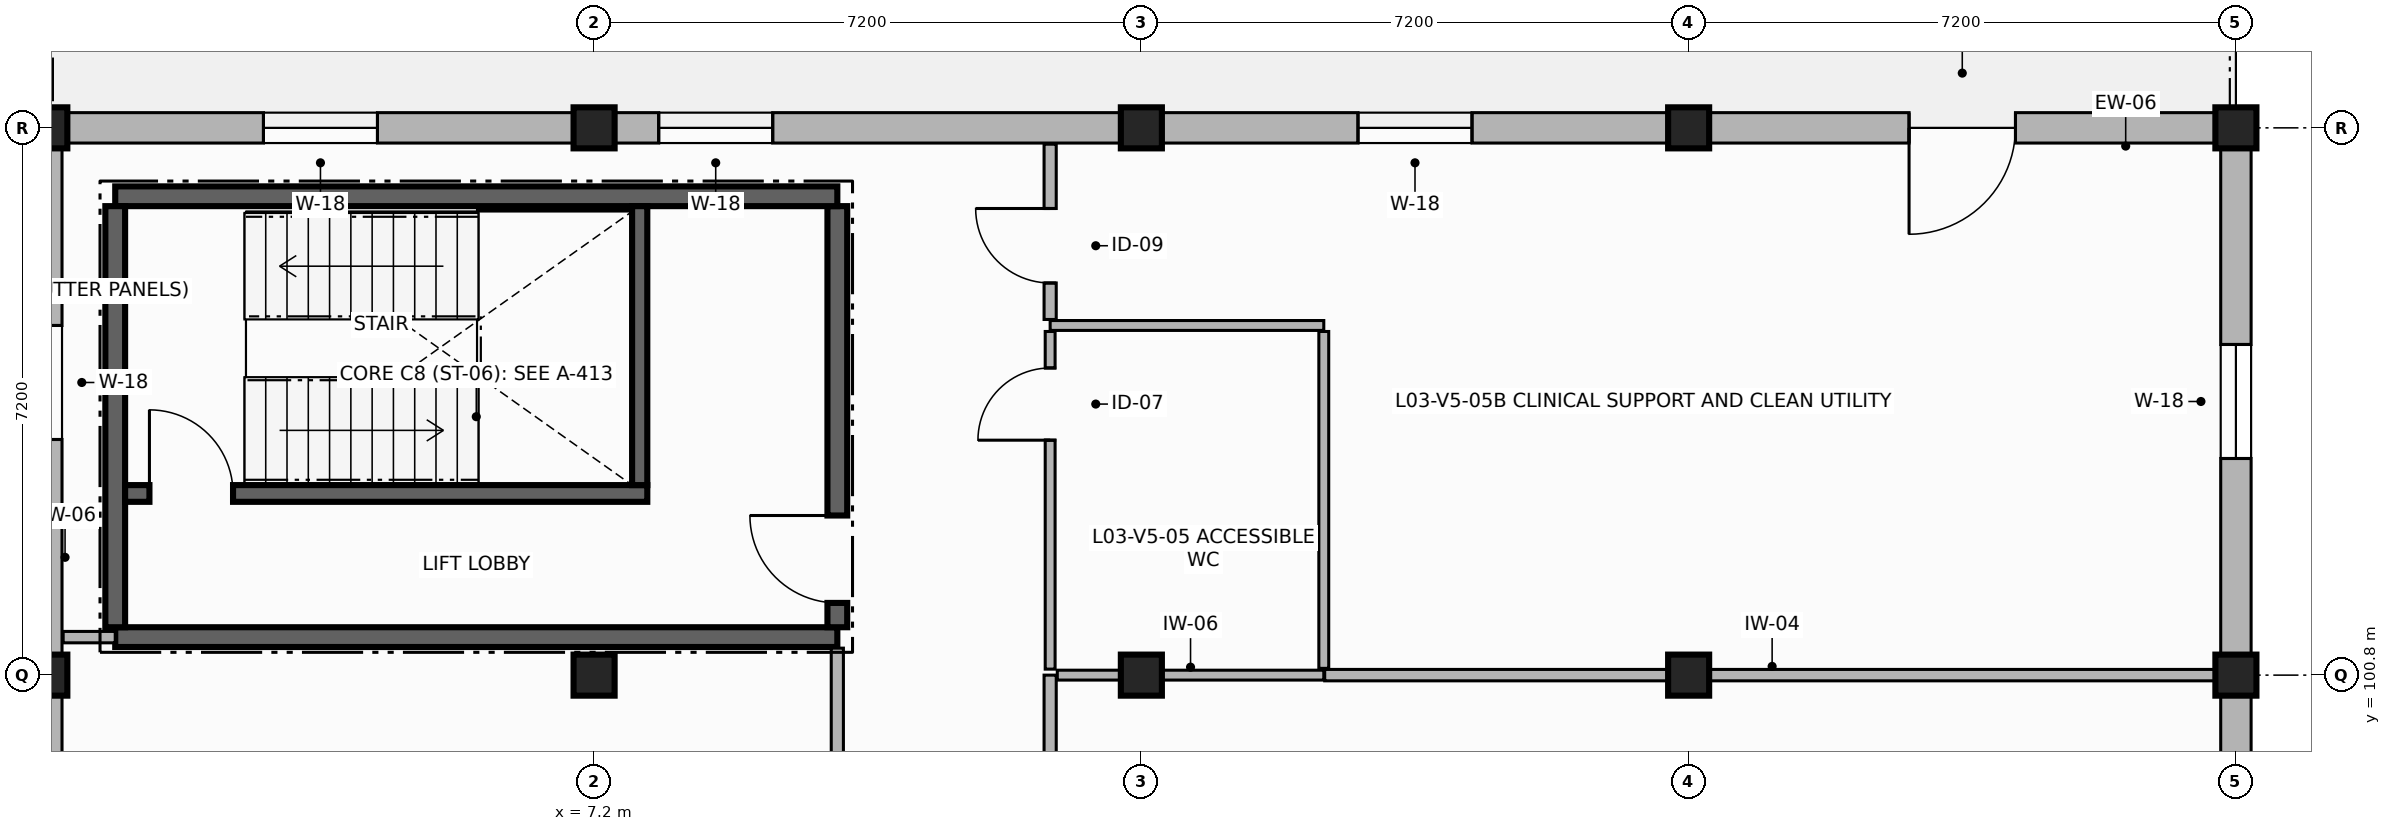
"""IFC4 building model, lengths in metres.
Left out: names, types, materials, properties, quantities, classifications, styles, units other than length and angle.
Written with IfcOpenShell. Run it as: python <this file> out.ifc"""

import sys

from ifc_helpers import new_model, si_unit, direction, frame, frame_2d, origin, origin_2d, place, context, subcontext, project, spatial, rectangle, extrude, element, fill, save


model = new_model("IFC4")
c1 = context("Model", 3, precision=1e-05, world=origin(), true_north=direction((0.0, 1.0)))
c2 = subcontext(c1, "Body", "Model", "MODEL_VIEW")
j1 = project(units=[si_unit("LENGTHUNIT", "METRE"), si_unit("PLANEANGLEUNIT", "RADIAN")], contexts=[c1])
p1 = place(None, origin())
s1 = spatial("IfcSite", under=j1, at=p1, CompositionType="ELEMENT")
p2 = place(p1, origin())
s2 = spatial("IfcBuilding", under=s1, at=p2, CompositionType="ELEMENT")
p3 = place(p2, frame((0.0, 0.0, 12.3)))
s3 = spatial("IfcBuildingStorey", under=s2, at=p3, CompositionType="ELEMENT", Elevation=12.3)
for number, where, z_axis, x_axis in (
    (1, (0.0, 100.8, 0.0), (0.0, 0.0, 1.0), (1.0, 0.0, 0.0)),
    (2, (0.0, 108.0, 0.0), (0.0, 0.0, 1.0), (1.0, 0.0, 0.0)),
    (3, (7.2, 100.8, 0.0), (0.0, 0.0, 1.0), (1.0, 0.0, 0.0)),
    (4, (7.2, 108.0, 0.0), (0.0, 0.0, 1.0), (1.0, 0.0, 0.0)),
    (5, (14.4, 100.8, 0.0), (0.0, 0.0, 1.0), (1.0, 0.0, 0.0)),
    (6, (14.4, 108.0, 0.0), (0.0, 0.0, 1.0), (1.0, 0.0, 0.0)),
    (7, (21.6, 100.8, 0.0), (0.0, 0.0, 1.0), (1.0, 0.0, 0.0)),
    (8, (21.6, 108.0, 0.0), (0.0, 0.0, 1.0), (1.0, 0.0, 0.0)),
    (9, (28.8, 100.8, 0.0), (0.0, 0.0, 1.0), (1.0, 0.0, 0.0)),
    (10, (28.8, 108.0, 0.0), (0.0, 0.0, 1.0), (1.0, 0.0, 0.0)),
):
    element("IfcColumn", number, at=place(p3, frame(where, z_axis=z_axis, x_axis=x_axis)), inside=s3, PredefinedType="COLUMN", context=c2, shape_type="SweptSolid", body=[
        extrude(rectangle(XDim=0.54, YDim=0.54, at=origin_2d()), origin(), (0.0, 0.0, 1.0), 3.39),
    ])
p4 = place(p3, frame((28.8, 93.6, 0.0), z_axis=(0.0, 0.0, 1.0), x_axis=(0.0, 1.0, 0.0)))
e11 = element("IfcWall", 11, at=p4, inside=s3, PredefinedType="SOLIDWALL", context=c2, shape_type="SweptSolid", body=[
    extrude(rectangle(XDim=7.2, YDim=0.4, at=frame_2d((3.6, 0.0))), origin(), (0.0, 0.0, 1.0), 2.72),
])
p5 = place(p4, frame((2.85, 0.0, 0.9)))
e12 = element("IfcOpeningElement", 12, at=p5, cuts=e11, PredefinedType="OPENING", context=c2, shape_type="SweptSolid", body=[
    extrude(rectangle(XDim=1.5, YDim=1.6, at=frame_2d((0.75, 0.8))), frame((0.0, 0.21, 0.0), z_axis=(0.0, -1.0, 0.0), x_axis=(1.0, 0.0, 0.0)), (0.0, 0.0, 1.0), 0.42),
])
p6 = place(p3, frame((28.8, 100.8, 0.0), z_axis=(0.0, 0.0, 1.0), x_axis=(0.0, 1.0, 0.0)))
e13 = element("IfcWall", 13, at=p6, inside=s3, PredefinedType="SOLIDWALL", context=c2, shape_type="SweptSolid", body=[
    extrude(rectangle(XDim=7.2, YDim=0.4, at=frame_2d((3.6, 0.0))), origin(), (0.0, 0.0, 1.0), 2.72),
])
p7 = place(p6, frame((2.85, 0.0, 0.9)))
e14 = element("IfcOpeningElement", 14, at=p7, cuts=e13, PredefinedType="OPENING", context=c2, shape_type="SweptSolid", body=[
    extrude(rectangle(XDim=1.5, YDim=1.6, at=frame_2d((0.75, 0.8))), frame((0.0, 0.21, 0.0), z_axis=(0.0, -1.0, 0.0), x_axis=(1.0, 0.0, 0.0)), (0.0, 0.0, 1.0), 0.42),
])
p8 = place(p3, frame((28.8, 108.0, 0.0), z_axis=(0.0, 0.0, 1.0), x_axis=(-1.0, 0.0, 0.0)))
e15 = element("IfcWall", 15, at=p8, inside=s3, PredefinedType="SOLIDWALL", context=c2, shape_type="SweptSolid", body=[
    extrude(rectangle(XDim=7.2, YDim=0.4, at=frame_2d((3.6, 0.0))), origin(), (0.0, 0.0, 1.0), 2.72),
])
p9 = place(p8, frame((2.9, 0.0, 0.0)))
e16 = element("IfcOpeningElement", 16, at=p9, cuts=e15, PredefinedType="OPENING", context=c2, shape_type="SweptSolid", body=[
    extrude(rectangle(XDim=1.4, YDim=2.25, at=frame_2d((0.7, 1.125))), frame((0.0, 0.21, 0.0), z_axis=(0.0, -1.0, 0.0), x_axis=(1.0, 0.0, 0.0)), (0.0, 0.0, 1.0), 0.42),
])
p10 = place(p3, frame((21.6, 108.0, 0.0), z_axis=(0.0, 0.0, 1.0), x_axis=(-1.0, 0.0, 0.0)))
e17 = element("IfcWall", 17, at=p10, inside=s3, PredefinedType="SOLIDWALL", context=c2, shape_type="SweptSolid", body=[
    extrude(rectangle(XDim=7.2, YDim=0.4, at=frame_2d((3.6, 0.0))), origin(), (0.0, 0.0, 1.0), 2.72),
])
p11 = place(p10, frame((2.85, 0.0, 0.9)))
e18 = element("IfcOpeningElement", 18, at=p11, cuts=e17, PredefinedType="OPENING", context=c2, shape_type="SweptSolid", body=[
    extrude(rectangle(XDim=1.5, YDim=1.6, at=frame_2d((0.75, 0.8))), frame((0.0, 0.21, 0.0), z_axis=(0.0, -1.0, 0.0), x_axis=(1.0, 0.0, 0.0)), (0.0, 0.0, 1.0), 0.42),
])
p12 = place(p3, frame((14.4, 108.0, 0.0), z_axis=(0.0, 0.0, 1.0), x_axis=(-1.0, 0.0, 0.0)))
e19 = element("IfcWall", 19, at=p12, inside=s3, PredefinedType="SOLIDWALL", context=c2, shape_type="SweptSolid", body=[
    extrude(rectangle(XDim=7.2, YDim=0.4, at=frame_2d((3.6, 0.0))), origin(), (0.0, 0.0, 1.0), 2.72),
])
p13 = place(p12, frame((4.85, 0.0, 0.9)))
e20 = element("IfcOpeningElement", 20, at=p13, cuts=e19, PredefinedType="OPENING", context=c2, shape_type="SweptSolid", body=[
    extrude(rectangle(XDim=1.5, YDim=1.6, at=frame_2d((0.75, 0.8))), frame((0.0, 0.21, 0.0), z_axis=(0.0, -1.0, 0.0), x_axis=(1.0, 0.0, 0.0)), (0.0, 0.0, 1.0), 0.42),
])
p14 = place(p3, frame((7.2, 108.0, 0.0), z_axis=(0.0, 0.0, 1.0), x_axis=(-1.0, 0.0, 0.0)))
e21 = element("IfcWall", 21, at=p14, inside=s3, PredefinedType="SOLIDWALL", context=c2, shape_type="SweptSolid", body=[
    extrude(rectangle(XDim=7.2, YDim=0.4, at=frame_2d((3.6, 0.0))), origin(), (0.0, 0.0, 1.0), 2.72),
])
p15 = place(p14, frame((2.85, 0.0, 0.9)))
e22 = element("IfcOpeningElement", 22, at=p15, cuts=e21, PredefinedType="OPENING", context=c2, shape_type="SweptSolid", body=[
    extrude(rectangle(XDim=1.5, YDim=1.6, at=frame_2d((0.75, 0.8))), frame((0.0, 0.21, 0.0), z_axis=(0.0, -1.0, 0.0), x_axis=(1.0, 0.0, 0.0)), (0.0, 0.0, 1.0), 0.42),
])
p16 = place(p3, frame((0.0, 108.0, 0.0), z_axis=(0.0, 0.0, 1.0), x_axis=(0.0, -1.0, 0.0)))
e23 = element("IfcWall", 23, at=p16, inside=s3, PredefinedType="SOLIDWALL", context=c2, shape_type="SweptSolid", body=[
    extrude(rectangle(XDim=7.2, YDim=0.4, at=frame_2d((3.6, 0.0))), origin(), (0.0, 0.0, 1.0), 2.72),
])
p17 = place(p16, frame((2.6, 0.0, 0.9)))
e24 = element("IfcOpeningElement", 24, at=p17, cuts=e23, PredefinedType="OPENING", context=c2, shape_type="SweptSolid", body=[
    extrude(rectangle(XDim=1.5, YDim=1.6, at=frame_2d((0.75, 0.8))), frame((0.0, 0.21, 0.0), z_axis=(0.0, -1.0, 0.0), x_axis=(1.0, 0.0, 0.0)), (0.0, 0.0, 1.0), 0.42),
])
p18 = place(p3, frame((0.0, 100.8, 0.0), z_axis=(0.0, 0.0, 1.0), x_axis=(0.0, -1.0, 0.0)))
e25 = element("IfcWall", 25, at=p18, inside=s3, PredefinedType="SOLIDWALL", context=c2, shape_type="SweptSolid", body=[
    extrude(rectangle(XDim=7.2, YDim=0.4, at=frame_2d((3.6, 0.0))), origin(), (0.0, 0.0, 1.0), 2.72),
])
p19 = place(p18, frame((2.85, 0.0, 0.9)))
e26 = element("IfcOpeningElement", 26, at=p19, cuts=e25, PredefinedType="OPENING", context=c2, shape_type="SweptSolid", body=[
    extrude(rectangle(XDim=1.5, YDim=1.6, at=frame_2d((0.75, 0.8))), frame((0.0, 0.21, 0.0), z_axis=(0.0, -1.0, 0.0), x_axis=(1.0, 0.0, 0.0)), (0.0, 0.0, 1.0), 0.42),
])
p20 = place(p3, frame((0.9, 101.3, 0.0), z_axis=(0.0, 0.0, 1.0), x_axis=(1.0, 0.0, 0.0)))
e27 = element("IfcWall", 27, at=p20, inside=s3, PredefinedType="SHEAR", context=c2, shape_type="SweptSolid", body=[
    extrude(rectangle(XDim=9.5, YDim=0.26, at=frame_2d((4.75, 0.0))), origin(), (0.0, 0.0, 1.0), 3.39),
])
p21 = place(p3, frame((10.4, 101.43, 0.0), z_axis=(0.0, 0.0, 1.0), x_axis=(0.0, 1.0, 0.0)))
e28 = element("IfcWall", 28, at=p21, inside=s3, PredefinedType="SHEAR", context=c2, shape_type="SweptSolid", body=[
    extrude(rectangle(XDim=5.54, YDim=0.26, at=frame_2d((2.77, 0.0))), origin(), (0.0, 0.0, 1.0), 3.39),
])
p22 = place(p21, frame((0.32, 0.0, 0.0)))
e29 = element("IfcOpeningElement", 29, at=p22, cuts=e28, PredefinedType="OPENING", context=c2, shape_type="SweptSolid", body=[
    extrude(rectangle(XDim=1.15, YDim=2.2, at=frame_2d((0.575, 1.1))), frame((0.0, 0.14, 0.0), z_axis=(0.0, -1.0, 0.0), x_axis=(1.0, 0.0, 0.0)), (0.0, 0.0, 1.0), 0.28),
])
p23 = place(p3, frame((10.4, 107.1, 0.0), z_axis=(0.0, 0.0, 1.0), x_axis=(-1.0, 0.0, 0.0)))
e30 = element("IfcWall", 30, at=p23, inside=s3, PredefinedType="SHEAR", context=c2, shape_type="SweptSolid", body=[
    extrude(rectangle(XDim=9.5, YDim=0.26, at=frame_2d((4.75, 0.0))), origin(), (0.0, 0.0, 1.0), 3.39),
])
p24 = place(p3, frame((0.9, 106.97, 0.0), z_axis=(0.0, 0.0, 1.0), x_axis=(0.0, -1.0, 0.0)))
e31 = element("IfcWall", 31, at=p24, inside=s3, PredefinedType="SHEAR", context=c2, shape_type="SweptSolid", body=[
    extrude(rectangle(XDim=5.54, YDim=0.26, at=frame_2d((2.77, 0.0))), origin(), (0.0, 0.0, 1.0), 3.39),
])
p25 = place(p3, frame((1.03, 103.19, 0.0), z_axis=(0.0, 0.0, 1.0), x_axis=(1.0, 0.0, 0.0)))
e32 = element("IfcWall", 32, at=p25, inside=s3, PredefinedType="SHEAR", context=c2, shape_type="SweptSolid", body=[
    extrude(rectangle(XDim=6.87, YDim=0.22, at=frame_2d((3.435, 0.0))), origin(), (0.0, 0.0, 1.0), 3.39),
])
p26 = place(p25, frame((0.32, 0.0, 0.0)))
e33 = element("IfcOpeningElement", 33, at=p26, cuts=e32, PredefinedType="OPENING", context=c2, shape_type="SweptSolid", body=[
    extrude(rectangle(XDim=1.1, YDim=2.15, at=frame_2d((0.55, 1.075))), frame((0.0, 0.12, 0.0), z_axis=(0.0, -1.0, 0.0), x_axis=(1.0, 0.0, 0.0)), (0.0, 0.0, 1.0), 0.24),
])
p27 = place(p3, frame((7.8, 103.3, 0.0), z_axis=(0.0, 0.0, 1.0), x_axis=(0.0, 1.0, 0.0)))
e34 = element("IfcWall", 34, at=p27, inside=s3, PredefinedType="SHEAR", context=c2, shape_type="SweptSolid", body=[
    extrude(rectangle(XDim=3.67, YDim=0.2, at=frame_2d((1.835, 0.0))), origin(), (0.0, 0.0, 1.0), 3.39),
])
p28 = place(p3, frame((0.215, 101.3, 0.0), z_axis=(0.0, 0.0, 1.0), x_axis=(1.0, 0.0, 0.0)))
e35 = element("IfcWall", 35, at=p28, inside=s3, PredefinedType="PARTITIONING", context=c2, shape_type="SweptSolid", body=[
    extrude(rectangle(XDim=0.685, YDim=0.15, at=frame_2d((0.342, 0.0))), origin(), (0.0, 0.0, 1.0), 2.7),
])
p29 = place(p3, frame((10.4, 101.155, 0.0), z_axis=(0.0, 0.0, 1.0), x_axis=(0.0, -1.0, 0.0)))
e36 = element("IfcWall", 36, at=p29, inside=s3, PredefinedType="PARTITIONING", context=c2, shape_type="SweptSolid", body=[
    extrude(rectangle(XDim=7.466, YDim=0.16, at=frame_2d((3.733, 0.0))), origin(), (0.0, 0.0, 1.0), 2.7),
])
p30 = place(p29, frame((3.327, 0.0, 0.0)))
e37 = element("IfcOpeningElement", 37, at=p30, cuts=e36, PredefinedType="OPENING", context=c2, shape_type="SweptSolid", body=[
    extrude(rectangle(XDim=1.05, YDim=2.15, at=frame_2d((0.525, 1.075))), frame((0.0, 0.09, 0.0), z_axis=(0.0, -1.0, 0.0), x_axis=(1.0, 0.0, 0.0)), (0.0, 0.0, 1.0), 0.18),
])
p31 = place(p3, frame((13.2, 86.474, 0.0), z_axis=(0.0, 0.0, 1.0), x_axis=(0.0, 1.0, 0.0)))
e38 = element("IfcWall", 38, at=p31, inside=s3, PredefinedType="PARTITIONING", context=c2, shape_type="SweptSolid", body=[
    extrude(rectangle(XDim=14.326, YDim=0.16, at=frame_2d((7.163, 0.0))), origin(), (0.0, 0.0, 1.0), 2.7),
])
p32 = place(p31, frame((2.903, 0.0, 0.0)))
e39 = element("IfcOpeningElement", 39, at=p32, cuts=e38, PredefinedType="OPENING", context=c2, shape_type="SweptSolid", body=[
    extrude(rectangle(XDim=1.25, YDim=2.2, at=frame_2d((0.625, 1.1))), frame((0.0, 0.09, 0.0), z_axis=(0.0, -1.0, 0.0), x_axis=(1.0, 0.0, 0.0)), (0.0, 0.0, 1.0), 0.18),
])
p33 = place(p3, frame((13.294, 100.8, 0.0), z_axis=(0.0, 0.0, 1.0), x_axis=(1.0, 0.0, 0.0)))
e40 = element("IfcWall", 40, at=p33, inside=s3, PredefinedType="PARTITIONING", context=c2, shape_type="SweptSolid", body=[
    extrude(rectangle(XDim=3.506, YDim=0.13, at=frame_2d((1.753, 0.0))), origin(), (0.0, 0.0, 1.0), 2.7),
])
p34 = place(p3, frame((16.812, 100.8, 0.0), z_axis=(0.0, 0.0, 1.0), x_axis=(1.0, 0.0, 0.0)))
e41 = element("IfcWall", 41, at=p34, inside=s3, PredefinedType="PARTITIONING", context=c2, shape_type="SweptSolid", body=[
    extrude(rectangle(XDim=11.773, YDim=0.15, at=frame_2d((5.886, 0.0))), origin(), (0.0, 0.0, 1.0), 2.7),
])
p35 = place(p3, frame((13.2, 105.4, 0.0), z_axis=(0.0, 0.0, 1.0), x_axis=(1.0, 0.0, 0.0)))
e42 = element("IfcWall", 42, at=p35, inside=s3, PredefinedType="PARTITIONING", context=c2, shape_type="SweptSolid", body=[
    extrude(rectangle(XDim=3.6, YDim=0.13, at=frame_2d((1.8, 0.0))), origin(), (0.0, 0.0, 1.0), 2.7),
])
p36 = place(p3, frame((16.8, 105.321, 0.0), z_axis=(0.0, 0.0, 1.0), x_axis=(0.0, -1.0, 0.0)))
e43 = element("IfcWall", 43, at=p36, inside=s3, PredefinedType="PARTITIONING", context=c2, shape_type="SweptSolid", body=[
    extrude(rectangle(XDim=4.432, YDim=0.13, at=frame_2d((2.216, 0.0))), origin(), (0.0, 0.0, 1.0), 2.7),
])
p37 = place(p3, frame((13.2, 100.879, 0.0), z_axis=(0.0, 0.0, 1.0), x_axis=(0.0, 1.0, 0.0)))
e44 = element("IfcWall", 44, at=p37, inside=s3, PredefinedType="PARTITIONING", context=c2, shape_type="SweptSolid", body=[
    extrude(rectangle(XDim=4.442, YDim=0.13, at=frame_2d((2.221, 0.0))), origin(), (0.0, 0.0, 1.0), 2.7),
])
p38 = place(p37, frame((3.012, 0.0, 0.0)))
e45 = element("IfcOpeningElement", 45, at=p38, cuts=e44, PredefinedType="OPENING", context=c2, shape_type="SweptSolid", body=[
    extrude(rectangle(XDim=0.95, YDim=2.1, at=frame_2d((0.475, 1.05))), frame((0.0, 0.075, 0.0), z_axis=(0.0, -1.0, 0.0), x_axis=(1.0, 0.0, 0.0)), (0.0, 0.0, 1.0), 0.15),
])
p39 = place(p3, frame((13.2, 105.479, 0.0), z_axis=(0.0, 0.0, 1.0), x_axis=(0.0, 1.0, 0.0)))
e46 = element("IfcWall", 46, at=p39, inside=s3, PredefinedType="PARTITIONING", context=c2, shape_type="SweptSolid", body=[
    extrude(rectangle(XDim=2.306, YDim=0.16, at=frame_2d((1.153, 0.0))), origin(), (0.0, 0.0, 1.0), 2.7),
])
p40 = place(p39, frame((0.48, 0.0, 0.0)))
e47 = element("IfcOpeningElement", 47, at=p40, cuts=e46, PredefinedType="OPENING", context=c2, shape_type="SweptSolid", body=[
    extrude(rectangle(XDim=0.98, YDim=2.15, at=frame_2d((0.49, 1.075))), frame((0.0, 0.09, 0.0), z_axis=(0.0, -1.0, 0.0), x_axis=(1.0, 0.0, 0.0)), (0.0, 0.0, 1.0), 0.18),
])
p41 = place(p7, origin())
e48 = element("IfcWindow", 48, at=p41, inside=s3, PartitioningType="SINGLE_PANEL", PredefinedType="WINDOW", context=c2, shape_type="SweptSolid", body=[
    extrude(rectangle(XDim=1.5, YDim=1.6, at=frame_2d((0.75, 0.8))), frame((0.0, 0.03, 0.0), z_axis=(0.0, -1.0, 0.0), x_axis=(1.0, 0.0, 0.0)), (0.0, 0.0, 1.0), 0.06),
])
fill(e14, e48)
p42 = place(p9, origin())
e49 = element("IfcDoor", 49, at=p42, inside=s3, OperationType="SINGLE_SWING_RIGHT", PredefinedType="DOOR", context=c2, shape_type="SweptSolid", body=[
    extrude(rectangle(XDim=1.4, YDim=2.25, at=frame_2d((0.7, 1.125))), frame((0.0, 0.025, 0.0), z_axis=(0.0, -1.0, 0.0), x_axis=(1.0, 0.0, 0.0)), (0.0, 0.0, 1.0), 0.05),
])
fill(e16, e49)
p43 = place(p11, origin())
e50 = element("IfcWindow", 50, at=p43, inside=s3, PartitioningType="SINGLE_PANEL", PredefinedType="WINDOW", context=c2, shape_type="SweptSolid", body=[
    extrude(rectangle(XDim=1.5, YDim=1.6, at=frame_2d((0.75, 0.8))), frame((0.0, 0.03, 0.0), z_axis=(0.0, -1.0, 0.0), x_axis=(1.0, 0.0, 0.0)), (0.0, 0.0, 1.0), 0.06),
])
fill(e18, e50)
p44 = place(p13, origin())
e51 = element("IfcWindow", 51, at=p44, inside=s3, PartitioningType="SINGLE_PANEL", PredefinedType="WINDOW", context=c2, shape_type="SweptSolid", body=[
    extrude(rectangle(XDim=1.5, YDim=1.6, at=frame_2d((0.75, 0.8))), frame((0.0, 0.03, 0.0), z_axis=(0.0, -1.0, 0.0), x_axis=(1.0, 0.0, 0.0)), (0.0, 0.0, 1.0), 0.06),
])
fill(e20, e51)
p45 = place(p15, origin())
e52 = element("IfcWindow", 52, at=p45, inside=s3, PartitioningType="SINGLE_PANEL", PredefinedType="WINDOW", context=c2, shape_type="SweptSolid", body=[
    extrude(rectangle(XDim=1.5, YDim=1.6, at=frame_2d((0.75, 0.8))), frame((0.0, 0.03, 0.0), z_axis=(0.0, -1.0, 0.0), x_axis=(1.0, 0.0, 0.0)), (0.0, 0.0, 1.0), 0.06),
])
fill(e22, e52)
p46 = place(p26, origin())
e53 = element("IfcDoor", 53, at=p46, inside=s3, OperationType="SINGLE_SWING_LEFT", PredefinedType="DOOR", context=c2, shape_type="SweptSolid", body=[
    extrude(rectangle(XDim=1.1, YDim=2.15, at=frame_2d((0.55, 1.075))), frame((0.0, 0.025, 0.0), z_axis=(0.0, -1.0, 0.0), x_axis=(1.0, 0.0, 0.0)), (0.0, 0.0, 1.0), 0.05),
])
fill(e33, e53)
p47 = place(p22, origin())
e54 = element("IfcDoor", 54, at=p47, inside=s3, OperationType="SINGLE_SWING_RIGHT", PredefinedType="DOOR", context=c2, shape_type="SweptSolid", body=[
    extrude(rectangle(XDim=1.15, YDim=2.2, at=frame_2d((0.575, 1.1))), frame((0.0, 0.025, 0.0), z_axis=(0.0, -1.0, 0.0), x_axis=(1.0, 0.0, 0.0)), (0.0, 0.0, 1.0), 0.05),
])
fill(e29, e54)
p48 = place(p38, origin())
e55 = element("IfcDoor", 55, at=p48, inside=s3, OperationType="SINGLE_SWING_LEFT", PredefinedType="DOOR", context=c2, shape_type="SweptSolid", body=[
    extrude(rectangle(XDim=0.95, YDim=2.1, at=frame_2d((0.475, 1.05))), frame((0.0, 0.025, 0.0), z_axis=(0.0, -1.0, 0.0), x_axis=(1.0, 0.0, 0.0)), (0.0, 0.0, 1.0), 0.05),
])
fill(e45, e55)
p49 = place(p40, origin())
e56 = element("IfcDoor", 56, at=p49, inside=s3, OperationType="SINGLE_SWING_RIGHT", PredefinedType="DOOR", context=c2, shape_type="SweptSolid", body=[
    extrude(rectangle(XDim=0.98, YDim=2.15, at=frame_2d((0.49, 1.075))), frame((0.0, 0.025, 0.0), z_axis=(0.0, -1.0, 0.0), x_axis=(1.0, 0.0, 0.0)), (0.0, 0.0, 1.0), 0.05),
])
fill(e47, e56)
save(model, sys.argv[1])
